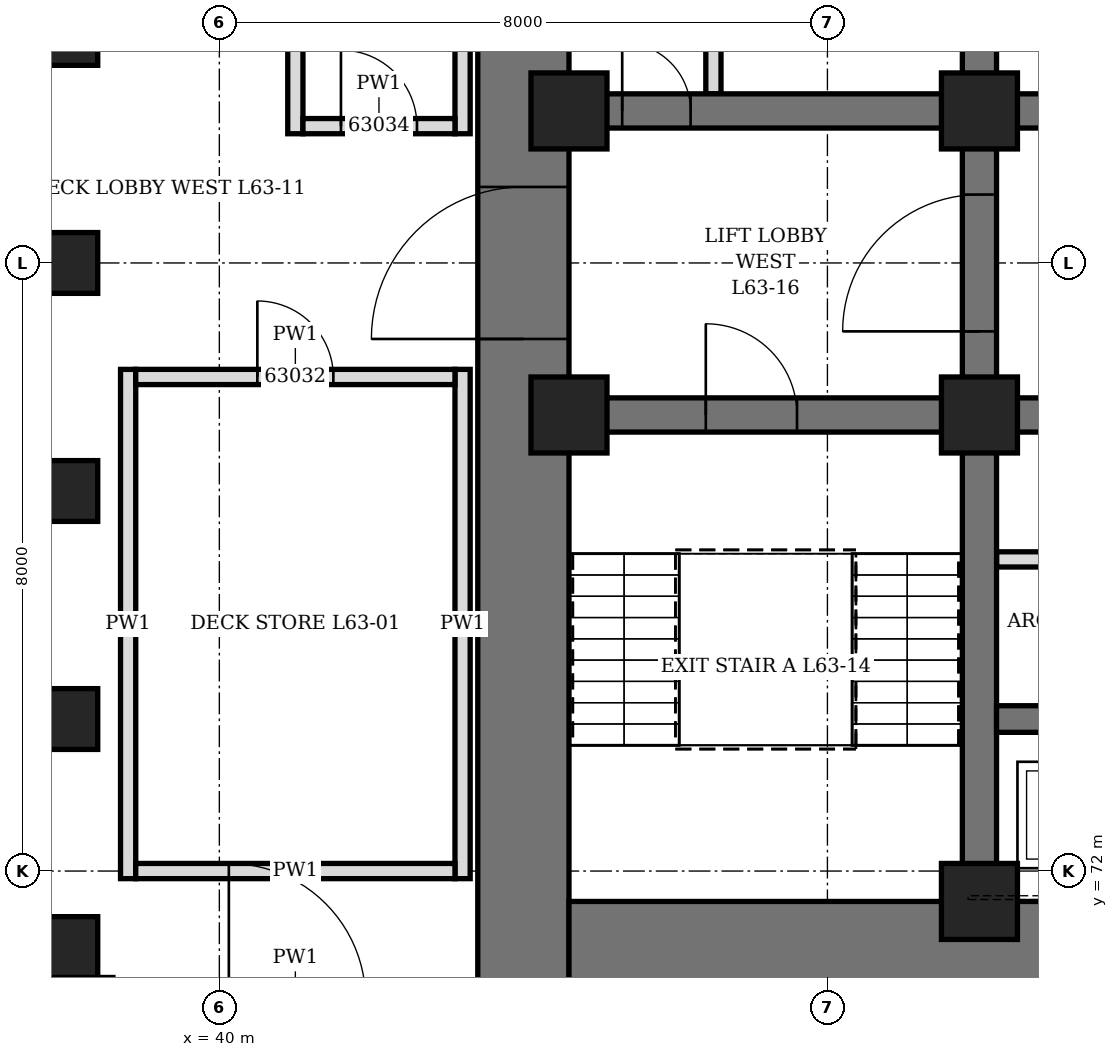
"""IFC4 building model, lengths in metres.
Left out: names, types, materials, properties, quantities, classifications, styles, units other than length and angle.
Written with IfcOpenShell. Run it as: python <this file> out.ifc"""

import sys

from ifc_helpers import new_model, si_unit, direction, frame, frame_2d, origin, origin_2d, place, context, subcontext, project, spatial, rectangle, hollow_rectangle, extrude, element, fill, save


model = new_model("IFC4")
c1 = context("Model", 3, precision=1e-05, world=origin(), true_north=direction((0.0, 1.0)))
c2 = subcontext(c1, "Body", "Model", "MODEL_VIEW")
j1 = project(units=[si_unit("LENGTHUNIT", "METRE"), si_unit("PLANEANGLEUNIT", "RADIAN")], contexts=[c1])
p1 = place(None, origin())
s1 = spatial("IfcSite", under=j1, at=p1, CompositionType="ELEMENT")
p2 = place(p1, origin())
s2 = spatial("IfcBuilding", under=s1, at=p2, CompositionType="ELEMENT")
p3 = place(p2, frame((0.0, 0.0, 279.7)))
s3 = spatial("IfcBuildingStorey", under=s2, at=p3, CompositionType="ELEMENT", Elevation=279.7)
for number, where, z_axis, x_axis in (
    (1, (38.0, 83.0, -0.25), (0.0, 0.0, 1.0), (0.0, 1.0, 0.0)),
    (2, (38.0, 80.0, -0.25), (0.0, 0.0, 1.0), (0.0, 1.0, 0.0)),
    (3, (38.0, 77.0, -0.25), (0.0, 0.0, 1.0), (0.0, 1.0, 0.0)),
    (4, (38.0, 74.0, -0.25), (0.0, 0.0, 1.0), (0.0, 1.0, 0.0)),
    (5, (38.0, 71.0, -0.25), (0.0, 0.0, 1.0), (0.0, 1.0, 0.0)),
):
    element("IfcColumn", number, at=place(p3, frame(where, z_axis=z_axis, x_axis=x_axis)), inside=s3, PredefinedType="COLUMN", context=c2, shape_type="SweptSolid", body=[
        extrude(hollow_rectangle(XDim=0.8, YDim=0.8, WallThickness=0.1, at=origin_2d()), origin(), (0.0, 0.0, 1.0), 6.25),
    ])
p4 = place(p3, frame((44.0, 70.4, 0.0), z_axis=(0.0, 0.0, 1.0), x_axis=(0.0, 1.0, 0.0)))
e6 = element("IfcWall", 6, at=p4, inside=s3, PredefinedType="SHEAR", context=c2, shape_type="SweptSolid", body=[
    extrude(rectangle(XDim=19.2, YDim=1.2, at=frame_2d((9.6, 0.0))), origin(), (0.0, 0.0, 1.0), 6.0),
])
p5 = place(p4, frame((8.6, 0.0, 0.0)))
e7 = element("IfcOpeningElement", 7, at=p5, cuts=e6, PredefinedType="OPENING", context=c2, shape_type="SweptSolid", body=[
    extrude(rectangle(XDim=2.0, YDim=2.4, at=frame_2d((1.0, 1.2))), frame((0.0, 0.61, 0.0), z_axis=(0.0, -1.0, 0.0), x_axis=(1.0, 0.0, 0.0)), (0.0, 0.0, 1.0), 1.22),
])
p6 = place(p3, frame((44.6, 71.0, 0.0), z_axis=(0.0, 0.0, 1.0), x_axis=(1.0, 0.0, 0.0)))
e8 = element("IfcWall", 8, at=p6, inside=s3, PredefinedType="SHEAR", context=c2, shape_type="SweptSolid", body=[
    extrude(rectangle(XDim=22.8, YDim=1.2, at=frame_2d((11.4, 0.0))), origin(), (0.0, 0.0, 1.0), 6.0),
])
p7 = place(p6, frame((6.35, 0.0, 0.0)))
e9 = element("IfcOpeningElement", 9, at=p7, cuts=e8, PredefinedType="OPENING", context=c2, shape_type="SweptSolid", body=[
    extrude(rectangle(XDim=1.1, YDim=2.2, at=frame_2d((0.55, 1.1))), frame((0.0, 0.61, 0.0), z_axis=(0.0, -1.0, 0.0), x_axis=(1.0, 0.0, 0.0)), (0.0, 0.0, 1.0), 1.22),
])
p8 = place(p6, frame((9.35, 0.0, 0.0)))
e10 = element("IfcOpeningElement", 10, at=p8, cuts=e8, PredefinedType="OPENING", context=c2, shape_type="SweptSolid", body=[
    extrude(rectangle(XDim=1.1, YDim=2.2, at=frame_2d((0.55, 1.1))), frame((0.0, 0.61, 0.0), z_axis=(0.0, -1.0, 0.0), x_axis=(1.0, 0.0, 0.0)), (0.0, 0.0, 1.0), 1.22),
])
p9 = place(p6, frame((12.35, 0.0, 0.0)))
e11 = element("IfcOpeningElement", 11, at=p9, cuts=e8, PredefinedType="OPENING", context=c2, shape_type="SweptSolid", body=[
    extrude(rectangle(XDim=1.1, YDim=2.2, at=frame_2d((0.55, 1.1))), frame((0.0, 0.61, 0.0), z_axis=(0.0, -1.0, 0.0), x_axis=(1.0, 0.0, 0.0)), (0.0, 0.0, 1.0), 1.22),
])
p10 = place(p6, frame((15.35, 0.0, 0.0)))
e12 = element("IfcOpeningElement", 12, at=p10, cuts=e8, PredefinedType="OPENING", context=c2, shape_type="SweptSolid", body=[
    extrude(rectangle(XDim=1.1, YDim=2.2, at=frame_2d((0.55, 1.1))), frame((0.0, 0.61, 0.0), z_axis=(0.0, -1.0, 0.0), x_axis=(1.0, 0.0, 0.0)), (0.0, 0.0, 1.0), 1.22),
])
p11 = place(p3, frame((50.0, 71.6, 0.0), z_axis=(0.0, 0.0, 1.0), x_axis=(0.0, 1.0, 0.0)))
e13 = element("IfcWall", 13, at=p11, inside=s3, PredefinedType="SHEAR", context=c2, shape_type="SweptSolid", body=[
    extrude(rectangle(XDim=16.8, YDim=0.45, at=frame_2d((8.4, 0.0))), origin(), (0.0, 0.0, 1.0), 6.0),
])
p12 = place(p11, frame((7.5, 0.0, 0.0)))
e14 = element("IfcOpeningElement", 14, at=p12, cuts=e13, PredefinedType="OPENING", context=c2, shape_type="SweptSolid", body=[
    extrude(rectangle(XDim=1.8, YDim=2.4, at=frame_2d((0.9, 1.2))), frame((0.0, 0.235, 0.0), z_axis=(0.0, -1.0, 0.0), x_axis=(1.0, 0.0, 0.0)), (0.0, 0.0, 1.0), 0.47),
])
p13 = place(p3, frame((44.6, 78.0, 0.0), z_axis=(0.0, 0.0, 1.0), x_axis=(1.0, 0.0, 0.0)))
e15 = element("IfcWall", 15, at=p13, inside=s3, PredefinedType="SHEAR", context=c2, shape_type="SweptSolid", body=[
    extrude(rectangle(XDim=5.175, YDim=0.45, at=frame_2d((2.587, 0.0))), origin(), (0.0, 0.0, 1.0), 6.0),
])
p14 = place(p13, frame((1.8, 0.0, 0.0)))
e16 = element("IfcOpeningElement", 16, at=p14, cuts=e15, PredefinedType="OPENING", context=c2, shape_type="SweptSolid", body=[
    extrude(rectangle(XDim=1.2, YDim=2.1, at=frame_2d((0.6, 1.05))), frame((0.0, 0.235, 0.0), z_axis=(0.0, -1.0, 0.0), x_axis=(1.0, 0.0, 0.0)), (0.0, 0.0, 1.0), 0.47),
])
p15 = place(p3, frame((44.6, 82.0, 0.0), z_axis=(0.0, 0.0, 1.0), x_axis=(1.0, 0.0, 0.0)))
e17 = element("IfcWall", 17, at=p15, inside=s3, PredefinedType="SHEAR", context=c2, shape_type="SweptSolid", body=[
    extrude(rectangle(XDim=5.175, YDim=0.45, at=frame_2d((2.587, 0.0))), origin(), (0.0, 0.0, 1.0), 6.0),
])
p16 = place(p15, frame((0.7, 0.0, 0.0)))
e18 = element("IfcOpeningElement", 18, at=p16, cuts=e17, PredefinedType="OPENING", context=c2, shape_type="SweptSolid", body=[
    extrude(rectangle(XDim=0.9, YDim=2.1, at=frame_2d((0.45, 1.05))), frame((0.0, 0.235, 0.0), z_axis=(0.0, -1.0, 0.0), x_axis=(1.0, 0.0, 0.0)), (0.0, 0.0, 1.0), 0.47),
])
p17 = place(p3, frame((50.225, 78.0, 0.0), z_axis=(0.0, 0.0, 1.0), x_axis=(1.0, 0.0, 0.0)))
e19 = element("IfcWall", 19, at=p17, inside=s3, PredefinedType="SHEAR", context=c2, shape_type="SweptSolid", body=[
    extrude(rectangle(XDim=11.55, YDim=0.45, at=frame_2d((5.775, 0.0))), origin(), (0.0, 0.0, 1.0), 6.0),
])
p18 = place(p17, frame((0.825, 0.0, 0.0)))
e20 = element("IfcOpeningElement", 20, at=p18, cuts=e19, PredefinedType="OPENING", context=c2, shape_type="SweptSolid", body=[
    extrude(rectangle(XDim=0.9, YDim=2.1, at=frame_2d((0.45, 1.05))), frame((0.0, 0.235, 0.0), z_axis=(0.0, -1.0, 0.0), x_axis=(1.0, 0.0, 0.0)), (0.0, 0.0, 1.0), 0.47),
])
p19 = place(p17, frame((3.825, 0.0, 0.0)))
e21 = element("IfcOpeningElement", 21, at=p19, cuts=e19, PredefinedType="OPENING", context=c2, shape_type="SweptSolid", body=[
    extrude(rectangle(XDim=0.9, YDim=2.1, at=frame_2d((0.45, 1.05))), frame((0.0, 0.235, 0.0), z_axis=(0.0, -1.0, 0.0), x_axis=(1.0, 0.0, 0.0)), (0.0, 0.0, 1.0), 0.47),
])
p20 = place(p17, frame((6.825, 0.0, 0.0)))
e22 = element("IfcOpeningElement", 22, at=p20, cuts=e19, PredefinedType="OPENING", context=c2, shape_type="SweptSolid", body=[
    extrude(rectangle(XDim=0.9, YDim=2.1, at=frame_2d((0.45, 1.05))), frame((0.0, 0.235, 0.0), z_axis=(0.0, -1.0, 0.0), x_axis=(1.0, 0.0, 0.0)), (0.0, 0.0, 1.0), 0.47),
])
p21 = place(p17, frame((9.825, 0.0, 0.0)))
e23 = element("IfcOpeningElement", 23, at=p21, cuts=e19, PredefinedType="OPENING", context=c2, shape_type="SweptSolid", body=[
    extrude(rectangle(XDim=0.9, YDim=2.1, at=frame_2d((0.45, 1.05))), frame((0.0, 0.235, 0.0), z_axis=(0.0, -1.0, 0.0), x_axis=(1.0, 0.0, 0.0)), (0.0, 0.0, 1.0), 0.47),
])
p22 = place(p3, frame((50.225, 82.0, 0.0), z_axis=(0.0, 0.0, 1.0), x_axis=(1.0, 0.0, 0.0)))
e24 = element("IfcWall", 24, at=p22, inside=s3, PredefinedType="SHEAR", context=c2, shape_type="SweptSolid", body=[
    extrude(rectangle(XDim=11.55, YDim=0.45, at=frame_2d((5.775, 0.0))), origin(), (0.0, 0.0, 1.0), 6.0),
])
p23 = place(p22, frame((0.825, 0.0, 0.0)))
e25 = element("IfcOpeningElement", 25, at=p23, cuts=e24, PredefinedType="OPENING", context=c2, shape_type="SweptSolid", body=[
    extrude(rectangle(XDim=0.9, YDim=2.1, at=frame_2d((0.45, 1.05))), frame((0.0, 0.235, 0.0), z_axis=(0.0, -1.0, 0.0), x_axis=(1.0, 0.0, 0.0)), (0.0, 0.0, 1.0), 0.47),
])
p24 = place(p22, frame((3.825, 0.0, 0.0)))
e26 = element("IfcOpeningElement", 26, at=p24, cuts=e24, PredefinedType="OPENING", context=c2, shape_type="SweptSolid", body=[
    extrude(rectangle(XDim=0.9, YDim=2.1, at=frame_2d((0.45, 1.05))), frame((0.0, 0.235, 0.0), z_axis=(0.0, -1.0, 0.0), x_axis=(1.0, 0.0, 0.0)), (0.0, 0.0, 1.0), 0.47),
])
p25 = place(p22, frame((6.825, 0.0, 0.0)))
e27 = element("IfcOpeningElement", 27, at=p25, cuts=e24, PredefinedType="OPENING", context=c2, shape_type="SweptSolid", body=[
    extrude(rectangle(XDim=0.9, YDim=2.1, at=frame_2d((0.45, 1.05))), frame((0.0, 0.235, 0.0), z_axis=(0.0, -1.0, 0.0), x_axis=(1.0, 0.0, 0.0)), (0.0, 0.0, 1.0), 0.47),
])
p26 = place(p22, frame((9.825, 0.0, 0.0)))
e28 = element("IfcOpeningElement", 28, at=p26, cuts=e24, PredefinedType="OPENING", context=c2, shape_type="SweptSolid", body=[
    extrude(rectangle(XDim=0.9, YDim=2.1, at=frame_2d((0.45, 1.05))), frame((0.0, 0.235, 0.0), z_axis=(0.0, -1.0, 0.0), x_axis=(1.0, 0.0, 0.0)), (0.0, 0.0, 1.0), 0.47),
])
p27 = place(p3, frame((50.225, 74.0, 0.0), z_axis=(0.0, 0.0, 1.0), x_axis=(1.0, 0.0, 0.0)))
e29 = element("IfcWall", 29, at=p27, inside=s3, PredefinedType="SHEAR", context=c2, shape_type="SweptSolid", body=[
    extrude(rectangle(XDim=11.55, YDim=0.35, at=frame_2d((5.775, 0.0))), origin(), (0.0, 0.0, 1.0), 6.0),
])
for number, where, z_axis, x_axis in (
    (30, (44.6, 78.0, 0.0), (0.0, 0.0, 1.0), (1.0, 0.0, 0.0)),
    (31, (44.6, 82.0, 0.0), (0.0, 0.0, 1.0), (1.0, 0.0, 0.0)),
    (32, (50.0, 71.6, 0.0), (0.0, 0.0, 1.0), (1.0, 0.0, 0.0)),
    (33, (50.0, 78.0, 0.0), (0.0, 0.0, 1.0), (1.0, 0.0, 0.0)),
    (34, (50.0, 82.0, 0.0), (0.0, 0.0, 1.0), (1.0, 0.0, 0.0)),
):
    element("IfcColumn", number, at=place(p3, frame(where, z_axis=z_axis, x_axis=x_axis)), inside=s3, PredefinedType="COLUMN", context=c2, shape_type="SweptSolid", body=[
        extrude(hollow_rectangle(XDim=1.0, YDim=1.0, WallThickness=0.15, at=origin_2d()), origin(), (0.0, 0.0, 1.0), 6.0),
    ])
p28 = place(p3, frame((46.5, 82.225, 0.0), z_axis=(0.0, 0.0, 1.0), x_axis=(0.0, 1.0, 0.0)))
e35 = element("IfcWall", 35, at=p28, inside=s3, PredefinedType="PARTITIONING", context=c2, shape_type="SweptSolid", body=[
    extrude(rectangle(XDim=3.05, YDim=0.2, at=frame_2d((1.525, 0.0))), origin(), (0.0, 0.0, 1.0), 5.75),
])
p29 = place(p28, frame((1.075, 0.0, 0.0)))
e36 = element("IfcOpeningElement", 36, at=p29, cuts=e35, PredefinedType="OPENING", context=c2, shape_type="SweptSolid", body=[
    extrude(rectangle(XDim=0.9, YDim=2.1, at=frame_2d((0.45, 1.05))), frame((0.0, 0.11, 0.0), z_axis=(0.0, -1.0, 0.0), x_axis=(1.0, 0.0, 0.0)), (0.0, 0.0, 1.0), 0.22),
])
p30 = place(p3, frame((50.225, 76.1, 0.0), z_axis=(0.0, 0.0, 1.0), x_axis=(1.0, 0.0, 0.0)))
e37 = element("IfcWall", 37, at=p30, inside=s3, PredefinedType="PARTITIONING", context=c2, shape_type="SweptSolid", body=[
    extrude(rectangle(XDim=2.55, YDim=0.2, at=frame_2d((1.275, 0.0))), origin(), (0.0, 0.0, 1.0), 5.75),
])
p31 = place(p30, frame((0.825, 0.0, 0.0)))
e38 = element("IfcOpeningElement", 38, at=p31, cuts=e37, PredefinedType="OPENING", context=c2, shape_type="SweptSolid", body=[
    extrude(rectangle(XDim=0.9, YDim=2.1, at=frame_2d((0.45, 1.05))), frame((0.0, 0.11, 0.0), z_axis=(0.0, -1.0, 0.0), x_axis=(1.0, 0.0, 0.0)), (0.0, 0.0, 1.0), 0.22),
])
for number, where, z_axis, x_axis in (
    (39, (38.8, 71.9, 0.0), (0.0, 0.0, 1.0), (0.0, 1.0, 0.0)),
    (40, (43.2, 71.9, 0.0), (0.0, 0.0, 1.0), (0.0, 1.0, 0.0)),
):
    element("IfcWall", number, at=place(p3, frame(where, z_axis=z_axis, x_axis=x_axis)), inside=s3, PredefinedType="PARTITIONING", context=c2, shape_type="SweptSolid", body=[
        extrude(rectangle(XDim=6.7, YDim=0.2, at=frame_2d((3.35, 0.0))), origin(), (0.0, 0.0, 1.0), 5.75),
    ])
p32 = place(p3, frame((38.9, 72.0, 0.0), z_axis=(0.0, 0.0, 1.0), x_axis=(1.0, 0.0, 0.0)))
e41 = element("IfcWall", 41, at=p32, inside=s3, PredefinedType="PARTITIONING", context=c2, shape_type="SweptSolid", body=[
    extrude(rectangle(XDim=4.2, YDim=0.2, at=frame_2d((2.1, 0.0))), origin(), (0.0, 0.0, 1.0), 5.75),
])
p33 = place(p3, frame((38.9, 78.5, 0.0), z_axis=(0.0, 0.0, 1.0), x_axis=(1.0, 0.0, 0.0)))
e42 = element("IfcWall", 42, at=p33, inside=s3, PredefinedType="PARTITIONING", context=c2, shape_type="SweptSolid", body=[
    extrude(rectangle(XDim=4.2, YDim=0.2, at=frame_2d((2.1, 0.0))), origin(), (0.0, 0.0, 1.0), 5.75),
])
p34 = place(p33, frame((1.6, 0.0, 0.0)))
e43 = element("IfcOpeningElement", 43, at=p34, cuts=e42, PredefinedType="OPENING", context=c2, shape_type="SweptSolid", body=[
    extrude(rectangle(XDim=1.0, YDim=2.1, at=frame_2d((0.5, 1.05))), frame((0.0, 0.11, 0.0), z_axis=(0.0, -1.0, 0.0), x_axis=(1.0, 0.0, 0.0)), (0.0, 0.0, 1.0), 0.22),
])
for number, where, z_axis, x_axis in (
    (44, (41.0, 81.7, 0.0), (0.0, 0.0, 1.0), (0.0, 1.0, 0.0)),
    (45, (43.2, 81.7, 0.0), (0.0, 0.0, 1.0), (0.0, 1.0, 0.0)),
):
    element("IfcWall", number, at=place(p3, frame(where, z_axis=z_axis, x_axis=x_axis)), inside=s3, PredefinedType="PARTITIONING", context=c2, shape_type="SweptSolid", body=[
        extrude(rectangle(XDim=6.8, YDim=0.2, at=frame_2d((3.4, 0.0))), origin(), (0.0, 0.0, 1.0), 5.75),
    ])
p35 = place(p3, frame((41.1, 81.8, 0.0), z_axis=(0.0, 0.0, 1.0), x_axis=(1.0, 0.0, 0.0)))
e46 = element("IfcWall", 46, at=p35, inside=s3, PredefinedType="PARTITIONING", context=c2, shape_type="SweptSolid", body=[
    extrude(rectangle(XDim=2.0, YDim=0.2, at=frame_2d((1.0, 0.0))), origin(), (0.0, 0.0, 1.0), 5.75),
])
p36 = place(p35, frame((0.5, 0.0, 0.0)))
e47 = element("IfcOpeningElement", 47, at=p36, cuts=e46, PredefinedType="OPENING", context=c2, shape_type="SweptSolid", body=[
    extrude(rectangle(XDim=1.0, YDim=2.1, at=frame_2d((0.5, 1.05))), frame((0.0, 0.11, 0.0), z_axis=(0.0, -1.0, 0.0), x_axis=(1.0, 0.0, 0.0)), (0.0, 0.0, 1.0), 0.22),
])
p37 = place(p3, frame((38.5, 70.2, 0.0), z_axis=(0.0, 0.0, 1.0), x_axis=(0.0, 1.0, 0.0)))
e48 = element("IfcWall", 48, at=p37, inside=s3, PredefinedType="PARTITIONING", context=c2, shape_type="SweptSolid", body=[
    extrude(rectangle(XDim=0.4, YDim=0.2, at=frame_2d((0.2, 0.0))), origin(), (0.0, 0.0, 1.0), 5.75),
])
p38 = place(p16, origin())
e49 = element("IfcDoor", 49, at=p38, inside=s3, OperationType="SINGLE_SWING_LEFT", PredefinedType="DOOR", context=c2, shape_type="SweptSolid", body=[
    extrude(rectangle(XDim=0.9, YDim=2.1, at=frame_2d((0.45, 1.05))), frame((0.0, 0.225, 0.0), z_axis=(0.0, -1.0, 0.0), x_axis=(1.0, 0.0, 0.0)), (0.0, 0.0, 1.0), 0.449),
])
fill(e18, e49)
p39 = place(p14, origin())
e50 = element("IfcDoor", 50, at=p39, inside=s3, OperationType="SINGLE_SWING_LEFT", PredefinedType="DOOR", context=c2, shape_type="SweptSolid", body=[
    extrude(rectangle(XDim=1.2, YDim=2.1, at=frame_2d((0.6, 1.05))), frame((0.0, 0.225, 0.0), z_axis=(0.0, -1.0, 0.0), x_axis=(1.0, 0.0, 0.0)), (0.0, 0.0, 1.0), 0.449),
])
fill(e16, e50)
p40 = place(p5, origin())
e51 = element("IfcDoor", 51, at=p40, inside=s3, OperationType="DOUBLE_DOOR_SINGLE_SWING", PredefinedType="DOOR", context=c2, shape_type="SweptSolid", body=[
    extrude(rectangle(XDim=2.0, YDim=2.4, at=frame_2d((1.0, 1.2))), frame((0.0, 0.35, 0.0), z_axis=(0.0, -1.0, 0.0), x_axis=(1.0, 0.0, 0.0)), (0.0, 0.0, 1.0), 0.7),
])
fill(e7, e51)
p41 = place(p12, origin())
e52 = element("IfcDoor", 52, at=p41, inside=s3, OperationType="DOUBLE_DOOR_SINGLE_SWING", PredefinedType="DOOR", context=c2, shape_type="SweptSolid", body=[
    extrude(rectangle(XDim=1.8, YDim=2.4, at=frame_2d((0.9, 1.2))), frame((0.0, 0.225, 0.0), z_axis=(0.0, -1.0, 0.0), x_axis=(1.0, 0.0, 0.0)), (0.0, 0.0, 1.0), 0.449),
])
fill(e14, e52)
p42 = place(p34, origin())
e53 = element("IfcDoor", 53, at=p42, inside=s3, OperationType="SINGLE_SWING_LEFT", PredefinedType="DOOR", context=c2, shape_type="SweptSolid", body=[
    extrude(rectangle(XDim=1.0, YDim=2.1, at=frame_2d((0.5, 1.05))), frame((0.0, 0.1, 0.0), z_axis=(0.0, -1.0, 0.0), x_axis=(1.0, 0.0, 0.0)), (0.0, 0.0, 1.0), 0.199),
])
fill(e43, e53)
p43 = place(p36, origin())
e54 = element("IfcDoor", 54, at=p43, inside=s3, OperationType="SINGLE_SWING_LEFT", PredefinedType="DOOR", context=c2, shape_type="SweptSolid", body=[
    extrude(rectangle(XDim=1.0, YDim=2.1, at=frame_2d((0.5, 1.05))), frame((0.0, 0.1, 0.0), z_axis=(0.0, -1.0, 0.0), x_axis=(1.0, 0.0, 0.0)), (0.0, 0.0, 1.0), 0.199),
])
fill(e47, e54)
save(model, sys.argv[1])
